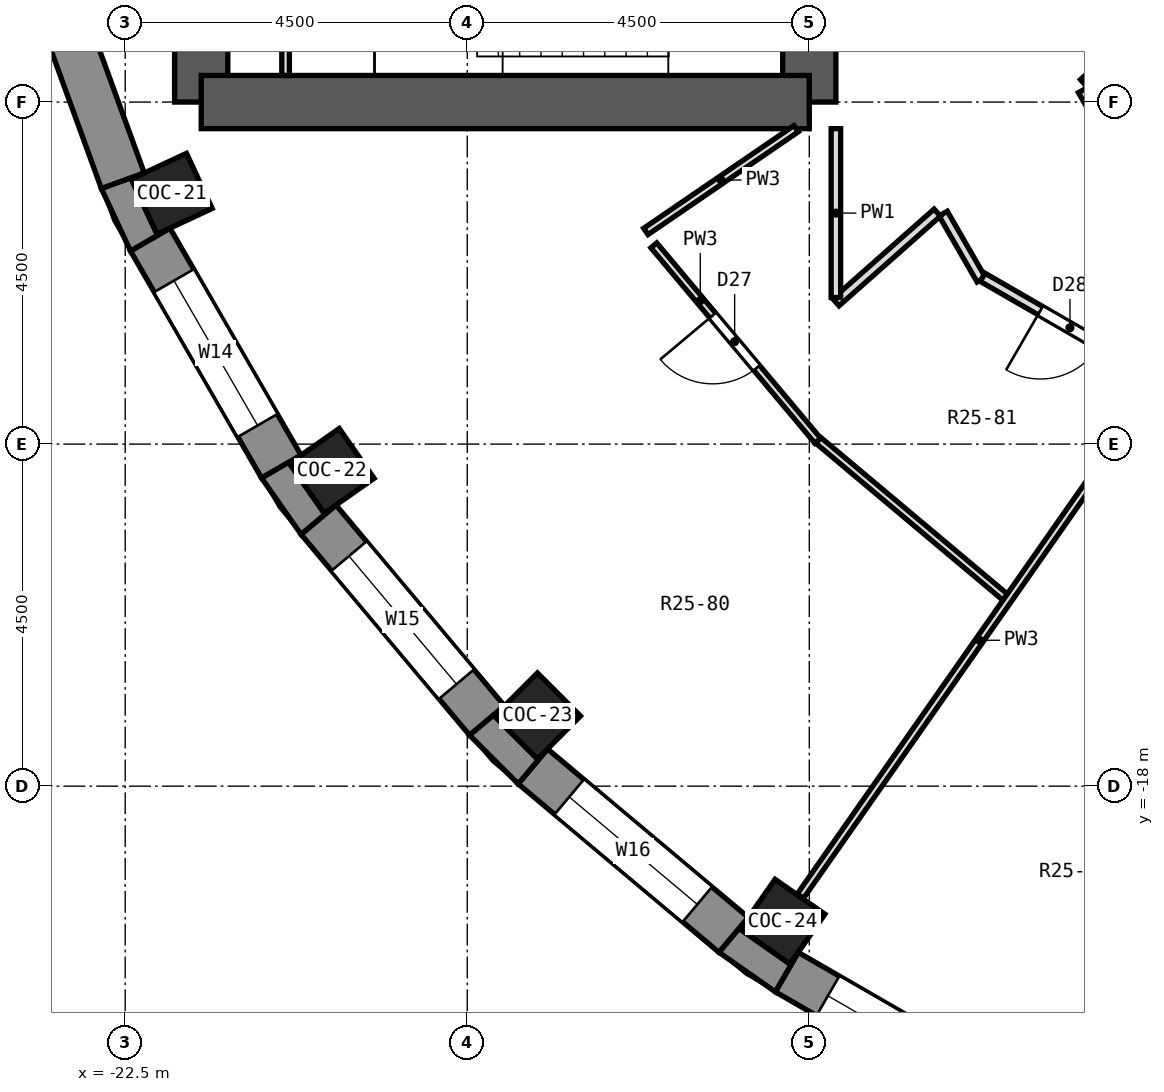
"""IFC4 building model, lengths in metres.
Left out: names, types, materials, properties, quantities, classifications, styles, units other than length and angle.
Written with IfcOpenShell. Run it as: python <this file> out.ifc"""

import sys

from ifc_helpers import new_model, si_unit, direction, frame, frame_2d, origin, origin_2d, place, context, subcontext, project, spatial, polyline, rectangle, outline, extrude, element, fill, save


model = new_model("IFC4")
c1 = context("Model", 3, precision=1e-05, world=origin(), true_north=direction((0.0, 1.0)))
c2 = subcontext(c1, "Body", "Model", "MODEL_VIEW")
j1 = project(units=[si_unit("LENGTHUNIT", "METRE"), si_unit("PLANEANGLEUNIT", "RADIAN")], contexts=[c1])
p1 = place(None, origin())
s1 = spatial("IfcSite", under=j1, at=p1, CompositionType="ELEMENT")
p2 = place(p1, origin())
s2 = spatial("IfcBuilding", under=s1, at=p2, CompositionType="ELEMENT")
p3 = place(p2, frame((0.0, 0.0, 160.8)))
s3 = spatial("IfcBuildingStorey", under=s2, at=p3, CompositionType="ELEMENT", Elevation=160.8)
for number, where, z_axis, x_axis in (
    (1, (-21.887, -10.206, 0.0), (0.0, 0.0, 1.0), (-0.906, -0.423, 0.0)),
    (2, (-19.782, -13.852, 0.0), (0.0, 0.0, 1.0), (-0.819, -0.574, 0.0)),
    (3, (-17.077, -17.077, 0.0), (0.0, 0.0, 1.0), (-0.707, -0.707, 0.0)),
    (4, (-13.852, -19.782, 0.0), (0.0, 0.0, 1.0), (-0.574, -0.819, 0.0)),
):
    element("IfcColumn", number, at=place(p3, frame(where, z_axis=z_axis, x_axis=x_axis)), inside=s3, PredefinedType="COLUMN", context=c2, shape_type="SweptSolid", body=[
        extrude(rectangle(XDim=0.8, YDim=0.8, at=origin_2d()), origin(), (0.0, 0.0, 1.0), 3.3),
    ])
p4 = place(p3, frame((-13.5, -9.0, 0.0), z_axis=(0.0, 0.0, 1.0), x_axis=(0.0, 1.0, 0.0)))
e5 = element("IfcWall", 5, at=p4, inside=s3, PredefinedType="SHEAR", context=c2, shape_type="SweptSolid", body=[
    extrude(rectangle(XDim=18.0, YDim=0.7, at=frame_2d((9.0, 0.0))), origin(), (0.0, 0.0, 1.0), 3.3),
])
p5 = place(p4, frame((15.4, 0.0, 0.0)))
e6 = element("IfcOpeningElement", 6, at=p5, cuts=e5, PredefinedType="OPENING", context=c2, shape_type="SweptSolid", body=[
    extrude(rectangle(XDim=1.2, YDim=2.1, at=frame_2d((0.6, 1.05))), frame((0.0, 0.362, 0.0), z_axis=(0.0, -1.0, 0.0), x_axis=(1.0, 0.0, 0.0)), (0.0, 0.0, 1.0), 0.724),
])
p6 = place(p4, frame((1.4, 0.0, 0.0)))
e7 = element("IfcOpeningElement", 7, at=p6, cuts=e5, PredefinedType="OPENING", context=c2, shape_type="SweptSolid", body=[
    extrude(rectangle(XDim=1.2, YDim=2.1, at=frame_2d((0.6, 1.05))), frame((0.0, 0.362, 0.0), z_axis=(0.0, -1.0, 0.0), x_axis=(1.0, 0.0, 0.0)), (0.0, 0.0, 1.0), 0.724),
])
p7 = place(p4, frame((7.5, 0.0, 0.0)))
e8 = element("IfcOpeningElement", 8, at=p7, cuts=e5, PredefinedType="OPENING", context=c2, shape_type="SweptSolid", body=[
    extrude(rectangle(XDim=3.0, YDim=2.4, at=frame_2d((1.5, 1.2))), frame((0.0, 0.362, 0.0), z_axis=(0.0, -1.0, 0.0), x_axis=(1.0, 0.0, 0.0)), (0.0, 0.0, 1.0), 0.724),
])
p8 = place(p3, frame((-21.5, -9.0, 0.0), z_axis=(0.0, 0.0, 1.0), x_axis=(0.0, 1.0, 0.0)))
e9 = element("IfcWall", 9, at=p8, inside=s3, PredefinedType="SHEAR", context=c2, shape_type="SweptSolid", body=[
    extrude(rectangle(XDim=18.0, YDim=0.7, at=frame_2d((9.0, 0.0))), origin(), (0.0, 0.0, 1.0), 3.3),
])
p9 = place(p8, frame((9.45, 0.0, 0.0)))
e10 = element("IfcOpeningElement", 10, at=p9, cuts=e9, PredefinedType="OPENING", context=c2, shape_type="SweptSolid", body=[
    extrude(rectangle(XDim=0.9, YDim=2.1, at=frame_2d((0.45, 1.05))), frame((0.0, 0.362, 0.0), z_axis=(0.0, -1.0, 0.0), x_axis=(1.0, 0.0, 0.0)), (0.0, 0.0, 1.0), 0.724),
])
p10 = place(p8, frame((7.65, 0.0, 0.0)))
e11 = element("IfcOpeningElement", 11, at=p10, cuts=e9, PredefinedType="OPENING", context=c2, shape_type="SweptSolid", body=[
    extrude(rectangle(XDim=0.9, YDim=2.1, at=frame_2d((0.45, 1.05))), frame((0.0, 0.362, 0.0), z_axis=(0.0, -1.0, 0.0), x_axis=(1.0, 0.0, 0.0)), (0.0, 0.0, 1.0), 0.724),
])
p11 = place(p3, frame((-13.5, -9.0, 0.0), z_axis=(0.0, 0.0, 1.0), x_axis=(-1.0, 0.0, 0.0)))
e12 = element("IfcWall", 12, at=p11, inside=s3, PredefinedType="SHEAR", context=c2, shape_type="SweptSolid", body=[
    extrude(rectangle(XDim=8.0, YDim=0.7, at=frame_2d((4.0, 0.0))), origin(), (0.0, 0.0, 1.0), 3.3),
])
p12 = place(p3, frame((-23.711, -6.794, 0.0), z_axis=(0.0, 0.0, 1.0), x_axis=(0.342032843455, -0.93968799822, 0.0)))
e13 = element("IfcWall", 13, at=p12, inside=s3, PredefinedType="SOLIDWALL", context=c2, shape_type="SweptSolid", body=[
    extrude(rectangle(XDim=3.45, YDim=0.6, at=frame_2d((1.725, 0.0))), origin(), (0.0, 0.0, 1.0), 2.85),
])
p13 = place(p3, frame((-22.171, -10.809, 0.0), z_axis=(0.0, 0.0, 1.0), x_axis=(0.499998129301, -0.86602648383, 0.0)))
e14 = element("IfcWall", 14, at=p13, inside=s3, PredefinedType="SOLIDWALL", context=c2, shape_type="SweptSolid", body=[
    extrude(rectangle(XDim=3.45, YDim=0.6, at=frame_2d((1.725, 0.0))), origin(), (0.0, 0.0, 1.0), 2.85),
])
p14 = place(p13, frame((0.625, 0.0, 0.9)))
e15 = element("IfcOpeningElement", 15, at=p14, cuts=e14, PredefinedType="OPENING", context=c2, shape_type="SweptSolid", body=[
    extrude(rectangle(XDim=2.2, YDim=1.8, at=frame_2d((1.1, 0.9))), frame((0.0, 0.312, 0.0), z_axis=(0.0, -1.0, 0.0), x_axis=(1.0, 0.0, 0.0)), (0.0, 0.0, 1.0), 0.624),
])
p15 = place(p3, frame((-19.957, -14.494, 0.0), z_axis=(0.0, 0.0, 1.0), x_axis=(0.642770398358, -0.766058884809, 0.0)))
e16 = element("IfcWall", 16, at=p15, inside=s3, PredefinedType="SOLIDWALL", context=c2, shape_type="SweptSolid", body=[
    extrude(rectangle(XDim=3.449, YDim=0.6, at=frame_2d((1.725, 0.0))), origin(), (0.0, 0.0, 1.0), 2.85),
])
p16 = place(p15, frame((0.625, 0.0, 0.9)))
e17 = element("IfcOpeningElement", 17, at=p16, cuts=e16, PredefinedType="OPENING", context=c2, shape_type="SweptSolid", body=[
    extrude(rectangle(XDim=2.2, YDim=1.8, at=frame_2d((1.1, 0.9))), frame((0.0, 0.312, 0.0), z_axis=(0.0, -1.0, 0.0), x_axis=(1.0, 0.0, 0.0)), (0.0, 0.0, 1.0), 0.624),
])
p17 = place(p3, frame((-17.137, -17.74, 0.0), z_axis=(0.0, 0.0, 1.0), x_axis=(0.766058884809, -0.642770398358, 0.0)))
e18 = element("IfcWall", 18, at=p17, inside=s3, PredefinedType="SOLIDWALL", context=c2, shape_type="SweptSolid", body=[
    extrude(rectangle(XDim=3.449, YDim=0.6, at=frame_2d((1.725, 0.0))), origin(), (0.0, 0.0, 1.0), 2.85),
])
p18 = place(p17, frame((0.625, 0.0, 0.9)))
e19 = element("IfcOpeningElement", 19, at=p18, cuts=e18, PredefinedType="OPENING", context=c2, shape_type="SweptSolid", body=[
    extrude(rectangle(XDim=2.2, YDim=1.8, at=frame_2d((1.1, 0.9))), frame((0.0, 0.312, 0.0), z_axis=(0.0, -1.0, 0.0), x_axis=(1.0, 0.0, 0.0)), (0.0, 0.0, 1.0), 0.624),
])
p19 = place(p3, frame((-13.796, -20.446, 0.0), z_axis=(0.0, 0.0, 1.0), x_axis=(0.86602648383, -0.499998129301, 0.0)))
e20 = element("IfcWall", 20, at=p19, inside=s3, PredefinedType="SOLIDWALL", context=c2, shape_type="SweptSolid", body=[
    extrude(rectangle(XDim=3.45, YDim=0.6, at=frame_2d((1.725, 0.0))), origin(), (0.0, 0.0, 1.0), 2.85),
])
p20 = place(p19, frame((0.625, 0.0, 0.9)))
e21 = element("IfcOpeningElement", 21, at=p20, cuts=e20, PredefinedType="OPENING", context=c2, shape_type="SweptSolid", body=[
    extrude(rectangle(XDim=2.2, YDim=1.8, at=frame_2d((1.1, 0.9))), frame((0.0, 0.312, 0.0), z_axis=(0.0, -1.0, 0.0), x_axis=(1.0, 0.0, 0.0)), (0.0, 0.0, 1.0), 0.624),
])
p21 = place(p3, origin())
e22 = element("IfcWall", 22, at=p21, inside=s3, PredefinedType="SOLIDWALL", context=c2, shape_type="SweptSolid", body=[
    extrude(outline(polyline([(-22.431, -10.959), (-21.911, -10.659), (-22.081, -10.738), (-22.419, -10.013), (-22.249, -9.934), (-22.813, -10.139), (-22.431, -10.959)])), origin(), (0.0, 0.0, 1.0), 2.85),
])
p22 = place(p3, origin())
e23 = element("IfcWall", 23, at=p22, inside=s3, PredefinedType="SOLIDWALL", context=c2, shape_type="SweptSolid", body=[
    extrude(outline(polyline([(-20.706, -13.946), (-20.187, -14.687), (-19.727, -14.302), (-19.881, -14.409), (-20.34, -13.754), (-20.186, -13.646), (-20.706, -13.946)])), origin(), (0.0, 0.0, 1.0), 2.85),
])
p23 = place(p3, origin())
e24 = element("IfcWall", 24, at=p23, inside=s3, PredefinedType="SOLIDWALL", context=c2, shape_type="SweptSolid", body=[
    extrude(outline(polyline([(-17.33, -17.969), (-16.944, -17.51), (-17.077, -17.642), (-17.642, -17.077), (-17.51, -16.944), (-17.969, -17.33), (-17.33, -17.969)])), origin(), (0.0, 0.0, 1.0), 2.85),
])
p24 = place(p3, origin())
e25 = element("IfcWall", 25, at=p24, inside=s3, PredefinedType="SOLIDWALL", context=c2, shape_type="SweptSolid", body=[
    extrude(outline(polyline([(-14.687, -20.187), (-13.946, -20.706), (-13.646, -20.186), (-13.754, -20.34), (-14.409, -19.881), (-14.302, -19.727), (-14.687, -20.187)])), origin(), (0.0, 0.0, 1.0), 2.85),
])
p25 = place(p3, frame((-11.739, -10.467, 0.0), z_axis=(0.0, 0.0, 1.0), x_axis=(0.499097354853, -0.866545919371, 0.0)))
e26 = element("IfcWall", 26, at=p25, inside=s3, PredefinedType="PARTITIONING", context=c2, shape_type="SweptSolid", body=[
    extrude(rectangle(XDim=1.003, YDim=0.125, at=frame_2d((0.501, 0.0))), origin(), (0.0, 0.0, 1.0), 2.85),
])
p26 = place(p3, frame((-9.905, -8.845, 0.0), z_axis=(0.0, 0.0, 1.0), x_axis=(0.499855389907, -0.866108878364, 0.0)))
e27 = element("IfcWall", 27, at=p26, inside=s3, PredefinedType="PARTITIONING", context=c2, shape_type="SweptSolid", body=[
    extrude(rectangle(XDim=0.848, YDim=0.125, at=frame_2d((0.424, 0.0))), origin(), (0.0, 0.0, 1.0), 2.85),
])
p27 = place(p3, frame((-15.545, -10.885, 0.0), z_axis=(0.0, 0.0, 1.0), x_axis=(0.642690725871, -0.766125727854, 0.0)))
e28 = element("IfcWall", 28, at=p27, inside=s3, PredefinedType="PARTITIONING", context=c2, shape_type="SweptSolid", body=[
    extrude(rectangle(XDim=3.358, YDim=0.1, at=frame_2d((1.679, 0.0))), origin(), (0.0, 0.0, 1.0), 2.85),
])
p28 = place(p27, frame((1.204, 0.0, 0.0)))
e29 = element("IfcOpeningElement", 29, at=p28, cuts=e28, PredefinedType="OPENING", context=c2, shape_type="SweptSolid", body=[
    extrude(rectangle(XDim=0.9, YDim=2.1, at=frame_2d((0.45, 1.05))), frame((0.0, 0.062, 0.0), z_axis=(0.0, -1.0, 0.0), x_axis=(1.0, 0.0, 0.0)), (0.0, 0.0, 1.0), 0.124),
])
p29 = place(p3, frame((-13.381, -13.451, 0.0), z_axis=(0.0, 0.0, 1.0), x_axis=(0.766064597799, -0.642763589509, 0.0)))
e30 = element("IfcWall", 30, at=p29, inside=s3, PredefinedType="PARTITIONING", context=c2, shape_type="SweptSolid", body=[
    extrude(rectangle(XDim=3.208, YDim=0.1, at=frame_2d((1.604, 0.0))), origin(), (0.0, 0.0, 1.0), 2.85),
])
p30 = place(p3, frame((-11.22, -11.305, 0.0), z_axis=(0.0, 0.0, 1.0), x_axis=(0.866074891173, -0.499914275531, 0.0)))
e31 = element("IfcWall", 31, at=p30, inside=s3, PredefinedType="PARTITIONING", context=c2, shape_type="SweptSolid", body=[
    extrude(rectangle(XDim=8.263, YDim=0.125, at=frame_2d((4.132, 0.0))), origin(), (0.0, 0.0, 1.0), 2.85),
])
p31 = place(p30, frame((0.877, 0.0, 0.0)))
e32 = element("IfcOpeningElement", 32, at=p31, cuts=e31, PredefinedType="OPENING", context=c2, shape_type="SweptSolid", body=[
    extrude(rectangle(XDim=0.9, YDim=2.1, at=frame_2d((0.45, 1.05))), frame((0.0, 0.074, 0.0), z_axis=(0.0, -1.0, 0.0), x_axis=(1.0, 0.0, 0.0)), (0.0, 0.0, 1.0), 0.149),
])
p32 = place(p30, frame((6.265, 0.0, 0.0)))
e33 = element("IfcOpeningElement", 33, at=p32, cuts=e31, PredefinedType="OPENING", context=c2, shape_type="SweptSolid", body=[
    extrude(rectangle(XDim=0.9, YDim=2.1, at=frame_2d((0.45, 1.05))), frame((0.0, 0.074, 0.0), z_axis=(0.0, -1.0, 0.0), x_axis=(1.0, 0.0, 0.0)), (0.0, 0.0, 1.0), 0.149),
])
p33 = place(p3, frame((-15.65, -10.702, 0.0), z_axis=(0.0, 0.0, 1.0), x_axis=(0.82545226585, 0.564471927382, 0.0)))
e34 = element("IfcWall", 34, at=p33, inside=s3, PredefinedType="PARTITIONING", context=c2, shape_type="SweptSolid", body=[
    extrude(rectangle(XDim=2.395, YDim=0.1, at=frame_2d((1.197, 0.0))), origin(), (0.0, 0.0, 1.0), 2.85),
])
p34 = place(p3, frame((-13.15, -11.634, 0.0), z_axis=(0.0, 0.0, 1.0), x_axis=(0.748988708904, 0.662582760065, 0.0)))
e35 = element("IfcWall", 35, at=p34, inside=s3, PredefinedType="PARTITIONING", context=c2, shape_type="SweptSolid", body=[
    extrude(rectangle(XDim=1.78, YDim=0.125, at=frame_2d((0.89, 0.0))), origin(), (0.0, 0.0, 1.0), 2.85),
])
p35 = place(p3, frame((-9.891, -8.751, 0.0), z_axis=(0.0, 0.0, 1.0), x_axis=(0.748982485585, 0.662589794886, 0.0)))
e36 = element("IfcWall", 36, at=p35, inside=s3, PredefinedType="PARTITIONING", context=c2, shape_type="SweptSolid", body=[
    extrude(rectangle(XDim=4.635, YDim=0.125, at=frame_2d((2.317, 0.0))), origin(), (0.0, 0.0, 1.0), 2.85),
])
p36 = place(p3, frame((-13.617, -19.447, 0.0), z_axis=(0.0, 0.0, 1.0), x_axis=(0.573585951544, 0.819145381597, 0.0)))
e37 = element("IfcWall", 37, at=p36, inside=s3, PredefinedType="PARTITIONING", context=c2, shape_type="SweptSolid", body=[
    extrude(rectangle(XDim=8.218, YDim=0.1, at=frame_2d((4.109, 0.0))), origin(), (0.0, 0.0, 1.0), 2.85),
])
p37 = place(p3, frame((-13.15, -11.572, 0.0), z_axis=(0.0, 0.0, 1.0), x_axis=(0.0, 1.0, 0.0)))
e38 = element("IfcWall", 38, at=p37, inside=s3, PredefinedType="PARTITIONING", context=c2, shape_type="SweptSolid", body=[
    extrude(rectangle(XDim=2.221, YDim=0.125, at=frame_2d((1.111, 0.0))), origin(), (0.0, 0.0, 1.0), 2.85),
])
p38 = place(p3, frame((-20.39, -8.65, 0.0), z_axis=(0.0, 0.0, 1.0), x_axis=(0.0, 1.0, 0.0)))
e39 = element("IfcWall", 39, at=p38, inside=s3, PredefinedType="PARTITIONING", context=c2, shape_type="SweptSolid", body=[
    extrude(rectangle(XDim=3.45, YDim=0.1, at=frame_2d((1.725, 0.0))), origin(), (0.0, 0.0, 1.0), 2.85),
])
p39 = place(p14, origin())
e40 = element("IfcWindow", 40, at=p39, inside=s3, PartitioningType="SINGLE_PANEL", PredefinedType="WINDOW", context=c2, shape_type="SweptSolid", body=[
    extrude(rectangle(XDim=2.2, YDim=1.8, at=frame_2d((1.1, 0.9))), frame((0.0, 0.18, 0.0), z_axis=(0.0, -1.0, 0.0), x_axis=(1.0, 0.0, 0.0)), (0.0, 0.0, 1.0), 0.06),
])
fill(e15, e40)
p40 = place(p16, origin())
e41 = element("IfcWindow", 41, at=p40, inside=s3, PartitioningType="SINGLE_PANEL", PredefinedType="WINDOW", context=c2, shape_type="SweptSolid", body=[
    extrude(rectangle(XDim=2.2, YDim=1.8, at=frame_2d((1.1, 0.9))), frame((0.0, 0.18, 0.0), z_axis=(0.0, -1.0, 0.0), x_axis=(1.0, 0.0, 0.0)), (0.0, 0.0, 1.0), 0.06),
])
fill(e17, e41)
p41 = place(p18, origin())
e42 = element("IfcWindow", 42, at=p41, inside=s3, PartitioningType="SINGLE_PANEL", PredefinedType="WINDOW", context=c2, shape_type="SweptSolid", body=[
    extrude(rectangle(XDim=2.2, YDim=1.8, at=frame_2d((1.1, 0.9))), frame((0.0, 0.18, 0.0), z_axis=(0.0, -1.0, 0.0), x_axis=(1.0, 0.0, 0.0)), (0.0, 0.0, 1.0), 0.06),
])
fill(e19, e42)
p42 = place(p20, origin())
e43 = element("IfcWindow", 43, at=p42, inside=s3, PartitioningType="SINGLE_PANEL", PredefinedType="WINDOW", context=c2, shape_type="SweptSolid", body=[
    extrude(rectangle(XDim=2.2, YDim=1.8, at=frame_2d((1.1, 0.9))), frame((0.0, 0.18, 0.0), z_axis=(0.0, -1.0, 0.0), x_axis=(1.0, 0.0, 0.0)), (0.0, 0.0, 1.0), 0.06),
])
fill(e21, e43)
p43 = place(p28, frame((0.9, 0.0, 0.0), z_axis=(0.0, 0.0, 1.0), x_axis=(-1.0, 0.0, 0.0)))
e44 = element("IfcDoor", 44, at=p43, inside=s3, OperationType="SINGLE_SWING_RIGHT", PredefinedType="DOOR", context=c2, shape_type="SweptSolid", body=[
    extrude(rectangle(XDim=0.9, YDim=2.1, at=frame_2d((0.45, 1.05))), frame((0.0, 0.025, 0.0), z_axis=(0.0, -1.0, 0.0), x_axis=(1.0, 0.0, 0.0)), (0.0, 0.0, 1.0), 0.05),
])
fill(e29, e44)
p44 = place(p31, frame((0.9, 0.0, 0.0), z_axis=(0.0, 0.0, 1.0), x_axis=(-1.0, 0.0, 0.0)))
e45 = element("IfcDoor", 45, at=p44, inside=s3, OperationType="SINGLE_SWING_RIGHT", PredefinedType="DOOR", context=c2, shape_type="SweptSolid", body=[
    extrude(rectangle(XDim=0.9, YDim=2.1, at=frame_2d((0.45, 1.05))), frame((0.0, 0.025, 0.0), z_axis=(0.0, -1.0, 0.0), x_axis=(1.0, 0.0, 0.0)), (0.0, 0.0, 1.0), 0.05),
])
fill(e32, e45)
save(model, sys.argv[1])
